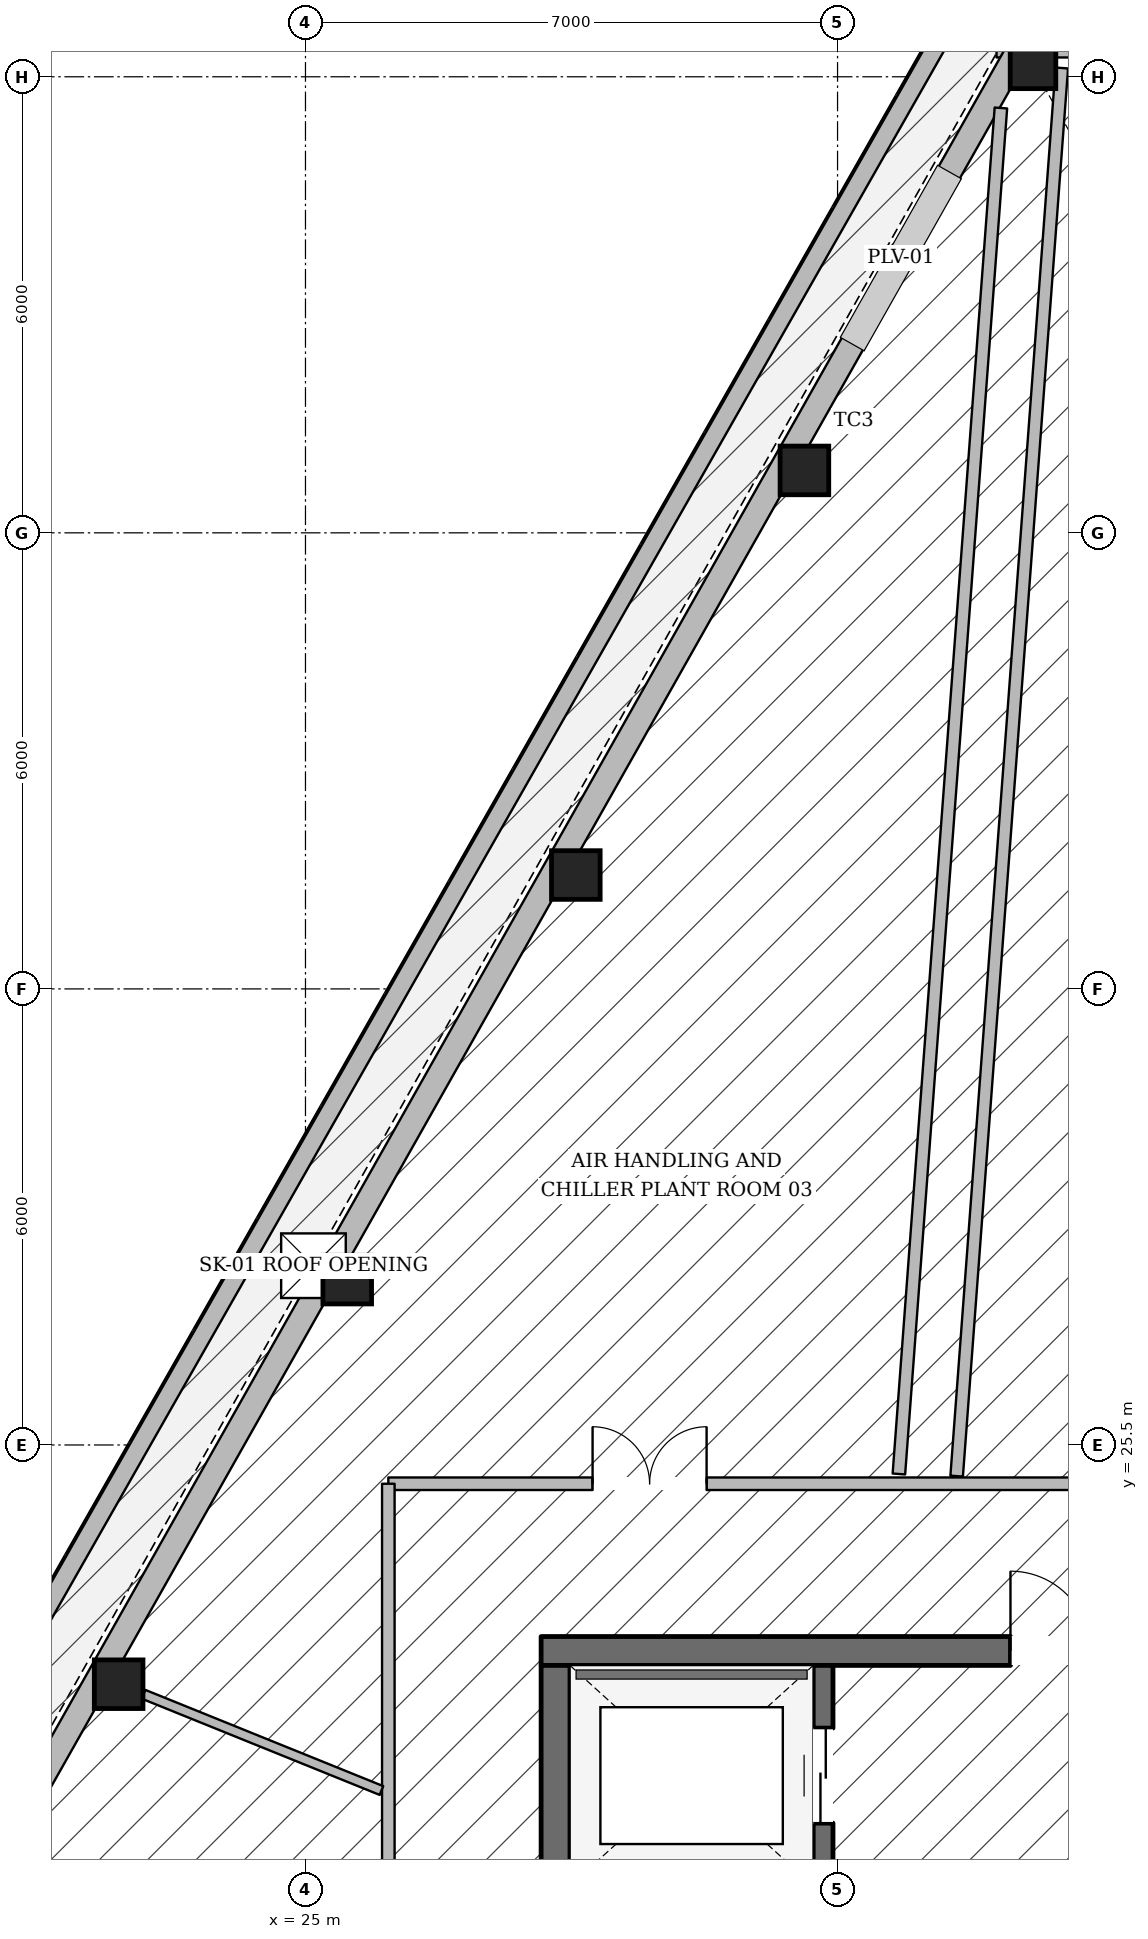
"""IFC4 building model, lengths in metres.
Left out: names, types, materials, properties, quantities, classifications, styles, units other than length and angle.
Written with IfcOpenShell. Run it as: python <this file> out.ifc"""

import sys

from ifc_helpers import new_model, si_unit, direction, frame, frame_2d, origin, origin_2d, place, context, subcontext, project, spatial, rectangle, hollow_rectangle, extrude, element, fill, save


model = new_model("IFC4")
c1 = context("Model", 3, precision=1e-05, world=origin(), true_north=direction((0.0, 1.0)))
c2 = subcontext(c1, "Body", "Model", "MODEL_VIEW")
j1 = project(units=[si_unit("LENGTHUNIT", "METRE"), si_unit("PLANEANGLEUNIT", "RADIAN")], contexts=[c1])
p1 = place(None, origin())
s1 = spatial("IfcSite", under=j1, at=p1, CompositionType="ELEMENT")
p2 = place(p1, origin())
s2 = spatial("IfcBuilding", under=s1, at=p2, CompositionType="ELEMENT")
p3 = place(p2, frame((0.0, 0.0, 234.3)))
s3 = spatial("IfcBuildingStorey", under=s2, at=p3, CompositionType="ELEMENT", Elevation=234.3)
p4 = place(p3, frame((28.1, 22.79, 0.0), z_axis=(0.0, 0.0, 1.0), x_axis=(1.0, 0.0, 0.0)))
e1 = element("IfcWall", 1, at=p4, inside=s3, PredefinedType="SOLIDWALL", context=c2, shape_type="SweptSolid", body=[
    extrude(rectangle(XDim=19.8, YDim=0.38, at=frame_2d((9.9, 0.0))), origin(), (0.0, 0.0, 1.0), 4.96),
])
p5 = place(p4, frame((6.175, 0.0, 0.0)))
e2 = element("IfcOpeningElement", 2, at=p5, cuts=e1, PredefinedType="OPENING", context=c2, shape_type="SweptSolid", body=[
    extrude(rectangle(XDim=1.05, YDim=2.15, at=frame_2d((0.525, 1.075))), frame((0.0, 0.2, 0.0), z_axis=(0.0, -1.0, 0.0), x_axis=(1.0, 0.0, 0.0)), (0.0, 0.0, 1.0), 0.4),
])
p6 = place(p4, frame((12.575, 0.0, 0.0)))
e3 = element("IfcOpeningElement", 3, at=p6, cuts=e1, PredefinedType="OPENING", context=c2, shape_type="SweptSolid", body=[
    extrude(rectangle(XDim=1.05, YDim=2.15, at=frame_2d((0.525, 1.075))), frame((0.0, 0.2, 0.0), z_axis=(0.0, -1.0, 0.0), x_axis=(1.0, 0.0, 0.0)), (0.0, 0.0, 1.0), 0.4),
])
p7 = place(p3, frame((28.29, 9.6, 0.0), z_axis=(0.0, 0.0, 1.0), x_axis=(0.0, 1.0, 0.0)))
e4 = element("IfcWall", 4, at=p7, inside=s3, PredefinedType="SOLIDWALL", context=c2, shape_type="SweptSolid", body=[
    extrude(rectangle(XDim=13.0, YDim=0.38, at=frame_2d((6.5, 0.0))), origin(), (0.0, 0.0, 1.0), 4.96),
])
p8 = place(p7, frame((0.2, 0.0, 0.0)))
e5 = element("IfcOpeningElement", 5, at=p8, cuts=e4, PredefinedType="OPENING", context=c2, shape_type="SweptSolid", body=[
    extrude(rectangle(XDim=1.1, YDim=2.15, at=frame_2d((0.55, 1.075))), frame((0.0, 0.2, 0.0), z_axis=(0.0, -1.0, 0.0), x_axis=(1.0, 0.0, 0.0)), (0.0, 0.0, 1.0), 0.4),
])
p9 = place(p7, frame((8.4, 0.0, 0.0)))
e6 = element("IfcOpeningElement", 6, at=p9, cuts=e4, PredefinedType="OPENING", context=c2, shape_type="SweptSolid", body=[
    extrude(rectangle(XDim=0.9, YDim=2.1, at=frame_2d((0.45, 1.05))), frame((0.0, 0.2, 0.0), z_axis=(0.0, -1.0, 0.0), x_axis=(1.0, 0.0, 0.0)), (0.0, 0.0, 1.0), 0.4),
])
p10 = place(p3, frame((31.81, 9.6, 0.0), z_axis=(0.0, 0.0, 1.0), x_axis=(0.0, 1.0, 0.0)))
e7 = element("IfcWall", 7, at=p10, inside=s3, PredefinedType="SHEAR", context=c2, shape_type="SweptSolid", body=[
    extrude(rectangle(XDim=13.0, YDim=0.26, at=frame_2d((6.5, 0.0))), origin(), (0.0, 0.0, 1.0), 4.96),
])
p11 = place(p10, frame((10.925, 0.0, 0.0)))
e8 = element("IfcOpeningElement", 8, at=p11, cuts=e7, PredefinedType="OPENING", context=c2, shape_type="SweptSolid", body=[
    extrude(rectangle(XDim=1.25, YDim=2.25, at=frame_2d((0.625, 1.125))), frame((0.0, 0.14, 0.0), z_axis=(0.0, -1.0, 0.0), x_axis=(1.0, 0.0, 0.0)), (0.0, 0.0, 1.0), 0.28),
])
p12 = place(p3, frame((34.572, 43.644, 0.0), z_axis=(0.0, 0.0, 1.0), x_axis=(1.0, 0.0, 0.0)))
e9 = element("IfcColumn", 9, at=p12, inside=s3, PredefinedType="COLUMN", context=c2, shape_type="SweptSolid", body=[
    extrude(hollow_rectangle(XDim=0.6, YDim=0.6, WallThickness=0.028, at=origin_2d()), origin(), (0.0, 0.0, 1.0), 4.96),
])
for number, where, z_axis, x_axis in (
    (10, (31.564, 38.321, 0.0), (0.0, 0.0, 1.0), (1.0, 0.0, 0.0)),
    (11, (28.557, 32.998, 0.0), (0.0, 0.0, 1.0), (1.0, 0.0, 0.0)),
    (12, (25.549, 27.676, 0.0), (0.0, 0.0, 1.0), (1.0, 0.0, 0.0)),
    (13, (22.542, 22.353, 0.0), (0.0, 0.0, 1.0), (1.0, 0.0, 0.0)),
):
    element("IfcColumn", number, at=place(p3, frame(where, z_axis=z_axis, x_axis=x_axis)), inside=s3, PredefinedType="COLUMN", context=c2, shape_type="SweptSolid", body=[
        extrude(hollow_rectangle(XDim=0.64, YDim=0.64, WallThickness=0.028, at=origin_2d()), origin(), (0.0, 0.0, 1.0), 4.96),
    ])
p13 = place(p3, frame((34.092, 43.914, 0.0), z_axis=(0.0, 0.0, 1.0), x_axis=(1.0, 0.0, 0.0)))
e14 = element("IfcWall", 14, at=p13, inside=s3, PredefinedType="STANDARD", context=c2, shape_type="SweptSolid", body=[
    extrude(rectangle(XDim=7.817, YDim=0.32, at=frame_2d((3.908, 0.0))), origin(), (0.0, 0.0, 1.0), 3.652),
])
p14 = place(p3, frame((16.06, 11.43, 0.0), z_axis=(0.0, 0.0, 1.0), x_axis=(0.491919583937, 0.87064063938, 0.0)))
e15 = element("IfcWall", 15, at=p14, inside=s3, PredefinedType="STANDARD", context=c2, shape_type="SweptSolid", body=[
    extrude(rectangle(XDim=37.633, YDim=0.32, at=frame_2d((18.816, 0.0))), origin(), (0.0, 0.0, 1.0), 3.652),
])
p15 = place(p3, frame((34.148, 45.396, 0.0), z_axis=(0.0, 0.0, 1.0), x_axis=(-0.49469479865, -0.869066773147, 0.0)))
e16 = element("IfcWall", 16, at=p15, inside=s3, PredefinedType="PARAPET", context=c2, shape_type="SweptSolid", body=[
    extrude(rectangle(XDim=39.544, YDim=0.24, at=frame_2d((19.772, 0.0))), origin(), (0.0, 0.0, 1.0), 1.25),
])
p16 = place(p3, frame((26.09, 24.99, 0.0), z_axis=(0.0, 0.0, 1.0), x_axis=(1.0, 0.0, 0.0)))
e17 = element("IfcWall", 17, at=p16, inside=s3, PredefinedType="PARTITIONING", context=c2, shape_type="SweptSolid", body=[
    extrude(rectangle(XDim=23.82, YDim=0.165, at=frame_2d((11.91, 0.0))), origin(), (0.0, 0.0, 1.0), 4.96),
])
p17 = place(p16, frame((11.16, 0.0, 0.0)))
e18 = element("IfcOpeningElement", 18, at=p17, cuts=e17, PredefinedType="OPENING", context=c2, shape_type="SweptSolid", body=[
    extrude(rectangle(XDim=1.5, YDim=2.25, at=frame_2d((0.75, 1.125))), frame((0.0, 0.093, 0.0), z_axis=(0.0, -1.0, 0.0), x_axis=(1.0, 0.0, 0.0)), (0.0, 0.0, 1.0), 0.185),
])
p18 = place(p16, frame((2.687, 0.0, 0.0)))
e19 = element("IfcOpeningElement", 19, at=p18, cuts=e17, PredefinedType="OPENING", context=c2, shape_type="SweptSolid", body=[
    extrude(rectangle(XDim=1.5, YDim=2.25, at=frame_2d((0.75, 1.125))), frame((0.0, 0.093, 0.0), z_axis=(0.0, -1.0, 0.0), x_axis=(1.0, 0.0, 0.0)), (0.0, 0.0, 1.0), 0.185),
])
p19 = place(p3, frame((26.09, 7.21, 0.0), z_axis=(0.0, 0.0, 1.0), x_axis=(0.0, 1.0, 0.0)))
e20 = element("IfcWall", 20, at=p19, inside=s3, PredefinedType="PARTITIONING", context=c2, shape_type="SweptSolid", body=[
    extrude(rectangle(XDim=17.78, YDim=0.165, at=frame_2d((8.89, 0.0))), origin(), (0.0, 0.0, 1.0), 4.699),
])
p20 = place(p19, frame((7.963, 0.0, 0.0)))
e21 = element("IfcOpeningElement", 21, at=p20, cuts=e20, PredefinedType="OPENING", context=c2, shape_type="SweptSolid", body=[
    extrude(rectangle(XDim=1.5, YDim=2.25, at=frame_2d((0.75, 1.125))), frame((0.0, 0.093, 0.0), z_axis=(0.0, -1.0, 0.0), x_axis=(1.0, 0.0, 0.0)), (0.0, 0.0, 1.0), 0.185),
])
p21 = place(p19, frame((1.028, 0.0, 0.0)))
e22 = element("IfcOpeningElement", 22, at=p21, cuts=e20, PredefinedType="OPENING", context=c2, shape_type="SweptSolid", body=[
    extrude(rectangle(XDim=1.5, YDim=2.25, at=frame_2d((0.75, 1.125))), frame((0.0, 0.093, 0.0), z_axis=(0.0, -1.0, 0.0), x_axis=(1.0, 0.0, 0.0)), (0.0, 0.0, 1.0), 0.185),
])
p22 = place(p3, frame((32.807, 25.118, 0.0), z_axis=(0.0, 0.0, 1.0), x_axis=(0.074484472145, 0.997222173545, 0.0)))
e23 = element("IfcWall", 23, at=p22, inside=s3, PredefinedType="PARTITIONING", context=c2, shape_type="SweptSolid", body=[
    extrude(rectangle(XDim=18.021, YDim=0.165, at=frame_2d((9.01, 0.0))), origin(), (0.0, 0.0, 1.0), 3.655),
])
p23 = place(p3, frame((33.567, 25.09, 0.0), z_axis=(0.0, 0.0, 1.0), x_axis=(0.074476298328, 0.997222784029, 0.0)))
e24 = element("IfcWall", 24, at=p23, inside=s3, PredefinedType="PARTITIONING", context=c2, shape_type="SweptSolid", body=[
    extrude(rectangle(XDim=18.577, YDim=0.165, at=frame_2d((9.289, 0.0))), origin(), (0.0, 0.0, 1.0), 4.96),
])
p24 = place(p3, frame((26.0, 20.954, 0.0), z_axis=(0.0, 0.0, 1.0), x_axis=(-0.927028237723, 0.374991528522, 0.0)))
e25 = element("IfcWall", 25, at=p24, inside=s3, PredefinedType="PARTITIONING", context=c2, shape_type="SweptSolid", body=[
    extrude(rectangle(XDim=3.376, YDim=0.125, at=frame_2d((1.688, 0.0))), origin(), (0.0, 0.0, 1.0), 3.655),
])
p25 = place(p3, frame((0.0, 0.0, -0.22)))
p26 = place(p25, frame((25.105, 27.858, 0.0)))
p27 = place(p26, frame((0.0, 0.0, 0.17)))
e26 = element("IfcWindow", 26, at=p27, inside=s3, PartitioningType="SINGLE_PANEL", PredefinedType="SKYLIGHT", context=c2, shape_type="SweptSolid", body=[
    extrude(rectangle(XDim=0.85, YDim=0.85, at=origin_2d()), origin(), (0.0, 0.0, 1.0), 0.05),
])
p28 = place(p5, origin())
e27 = element("IfcDoor", 27, at=p28, inside=s3, OperationType="SINGLE_SWING_LEFT", PredefinedType="DOOR", context=c2, shape_type="SweptSolid", body=[
    extrude(rectangle(XDim=1.05, YDim=2.15, at=frame_2d((0.525, 1.075))), frame((0.0, 0.025, 0.0), z_axis=(0.0, -1.0, 0.0), x_axis=(1.0, 0.0, 0.0)), (0.0, 0.0, 1.0), 0.05),
])
fill(e2, e27)
p29 = place(p11, origin())
e28 = element("IfcDoor", 28, at=p29, inside=s3, OperationType="DOUBLE_DOOR_SLIDING", PredefinedType="DOOR", context=c2, shape_type="SweptSolid", body=[
    extrude(rectangle(XDim=1.25, YDim=2.25, at=frame_2d((0.625, 1.125))), frame((0.0, 0.025, 0.0), z_axis=(0.0, -1.0, 0.0), x_axis=(1.0, 0.0, 0.0)), (0.0, 0.0, 1.0), 0.05),
])
fill(e8, e28)
p30 = place(p18, origin())
e29 = element("IfcDoor", 29, at=p30, inside=s3, OperationType="DOUBLE_DOOR_SINGLE_SWING", PredefinedType="DOOR", context=c2, shape_type="SweptSolid", body=[
    extrude(rectangle(XDim=1.5, YDim=2.25, at=frame_2d((0.75, 1.125))), frame((0.0, 0.025, 0.0), z_axis=(0.0, -1.0, 0.0), x_axis=(1.0, 0.0, 0.0)), (0.0, 0.0, 1.0), 0.05),
])
fill(e19, e29)
save(model, sys.argv[1])
